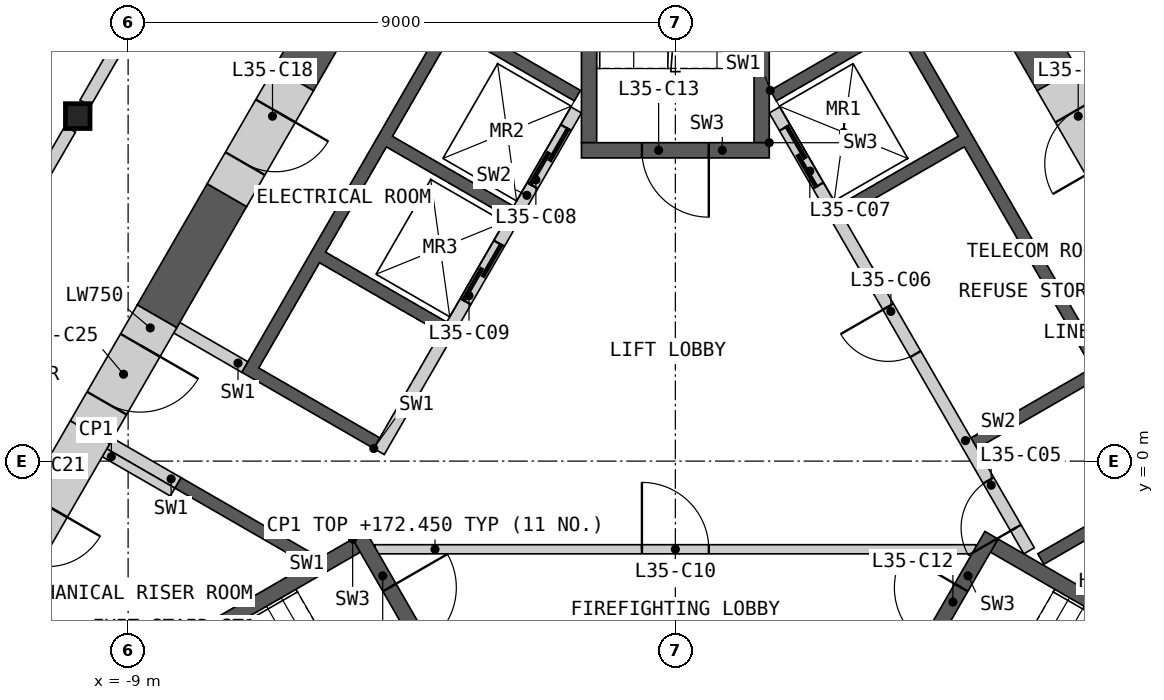
"""IFC4 building model, lengths in metres.
Left out: names, types, materials, properties, quantities, classifications, styles, units other than length and angle.
Written with IfcOpenShell. Run it as: python <this file> out.ifc"""

import sys

from ifc_helpers import new_model, si_unit, direction, frame, frame_2d, origin, origin_2d, place, context, subcontext, project, spatial, polyline, rectangle, i_section, outline, extrude, element, fill, save


model = new_model("IFC4")
c1 = context("Model", 3, precision=1e-05, world=origin(), true_north=direction((0.0, 1.0)))
c2 = subcontext(c1, "Body", "Model", "MODEL_VIEW")
j1 = project(units=[si_unit("LENGTHUNIT", "METRE"), si_unit("PLANEANGLEUNIT", "RADIAN")], contexts=[c1])
p1 = place(None, origin())
s1 = spatial("IfcSite", under=j1, at=p1, CompositionType="ELEMENT")
p2 = place(p1, origin())
s2 = spatial("IfcBuilding", under=s1, at=p2, CompositionType="ELEMENT")
p3 = place(p2, frame((0.0, 0.0, 169.2)))
s3 = spatial("IfcBuildingStorey", under=s2, at=p3, CompositionType="ELEMENT", Elevation=169.2)
p4 = place(p3, frame((-9.828, 5.675, 0.0), z_axis=(0.0, 0.0, 1.0), x_axis=(1.0, 0.0, 0.0)))
e1 = element("IfcColumn", 1, at=p4, inside=s3, PredefinedType="COLUMN", context=c2, shape_type="SweptSolid", body=[
    extrude(i_section(OverallWidth=0.404, OverallDepth=0.407, WebThickness=0.027, FlangeThickness=0.044, at=origin_2d()), origin(), (0.0, 0.0, 1.0), 3.6),
])
p5 = place(p3, origin())
e2 = element("IfcWall", 2, at=p5, inside=s3, PredefinedType="SHEAR", context=c2, shape_type="SweptSolid", body=[
    extrude(outline(polyline([(1.561, 6.097), (3.731, 7.35), (7.131, 1.461), (4.96, 0.208), (4.861, 0.381), (6.852, 1.531), (4.752, 5.169), (2.76, 4.019), (2.66, 4.192), (4.652, 5.342), (3.652, 7.074), (1.66, 5.924), (1.561, 6.097)])), origin(), (0.0, 0.0, 1.0), 3.25),
])
p6 = place(p3, origin())
e3 = element("IfcWall", 3, at=p6, inside=s3, PredefinedType="SHEAR", context=c2, shape_type="SweptSolid", body=[
    extrude(outline(polyline([(8.231, -0.444), (6.061, -1.697), (5.96, -1.524), (8.131, -0.271), (8.231, -0.444)])), origin(), (0.0, 0.0, 1.0), 3.25),
])
p7 = place(p3, frame((5.817, -1.476, 0.0), z_axis=(0.0, 0.0, 1.0), x_axis=(-0.500002616675, 0.866023893041, 0.0)))
e4 = element("IfcWall", 4, at=p7, inside=s3, PredefinedType="SOLIDWALL", context=c2, shape_type="SweptSolid", body=[
    extrude(rectangle(XDim=8.373, YDim=0.2, at=frame_2d((4.187, 0.0))), origin(), (0.0, 0.0, 1.0), 3.25),
])
p8 = place(p7, frame((0.437, 0.0, 0.0)))
e5 = element("IfcOpeningElement", 5, at=p8, cuts=e4, PredefinedType="OPENING", context=c2, shape_type="SweptSolid", body=[
    extrude(rectangle(XDim=0.9, YDim=2.1, at=frame_2d((0.45, 1.05))), frame((0.0, 0.11, 0.0), z_axis=(0.0, -1.0, 0.0), x_axis=(1.0, 0.0, 0.0)), (0.0, 0.0, 1.0), 0.22),
])
p9 = place(p7, frame((3.737, 0.0, 0.0)))
e6 = element("IfcOpeningElement", 6, at=p9, cuts=e4, PredefinedType="OPENING", context=c2, shape_type="SweptSolid", body=[
    extrude(rectangle(XDim=0.9, YDim=2.1, at=frame_2d((0.45, 1.05))), frame((0.0, 0.11, 0.0), z_axis=(0.0, -1.0, 0.0), x_axis=(1.0, 0.0, 0.0)), (0.0, 0.0, 1.0), 0.22),
])
p10 = place(p7, frame((6.937, 0.0, 0.0)))
e7 = element("IfcOpeningElement", 7, at=p10, cuts=e4, PredefinedType="OPENING", context=c2, shape_type="SweptSolid", body=[
    extrude(rectangle(XDim=1.1, YDim=2.1, at=frame_2d((0.55, 1.05))), frame((0.0, 0.11, 0.0), z_axis=(0.0, -1.0, 0.0), x_axis=(1.0, 0.0, 0.0)), (0.0, 0.0, 1.0), 0.22),
])
p11 = place(p3, origin())
e8 = element("IfcWall", 8, at=p11, inside=s3, PredefinedType="SHEAR", context=c2, shape_type="SweptSolid", body=[
    extrude(outline(polyline([(-6.061, -1.697), (-8.231, -0.444), (-8.131, -0.271), (-5.96, -1.524), (-6.061, -1.697)])), origin(), (0.0, 0.0, 1.0), 3.25),
])
p12 = place(p3, origin())
e9 = element("IfcWall", 9, at=p12, inside=s3, PredefinedType="SHEAR", context=c2, shape_type="SweptSolid", body=[
    extrude(outline(polyline([(-4.96, 0.208), (-7.131, 1.461), (-3.731, 7.35), (-1.561, 6.097), (-1.66, 5.924), (-3.652, 7.074), (-4.652, 5.342), (-2.66, 4.192), (-2.76, 4.019), (-4.752, 5.169), (-5.752, 3.437), (-3.76, 2.287), (-3.861, 2.113), (-5.852, 3.263), (-6.852, 1.531), (-4.861, 0.381), (-4.96, 0.208)])), origin(), (0.0, 0.0, 1.0), 3.25),
])
p13 = place(p3, frame((-1.631, 5.776, 0.0), z_axis=(0.0, 0.0, 1.0), x_axis=(-0.499992876559, -0.866029516466, 0.0)))
e10 = element("IfcWall", 10, at=p13, inside=s3, PredefinedType="SOLIDWALL", context=c2, shape_type="SweptSolid", body=[
    extrude(rectangle(XDim=6.486, YDim=0.2, at=frame_2d((3.243, 0.0))), origin(), (0.0, 0.0, 1.0), 3.25),
])
p14 = place(p13, frame((0.337, 0.0, 0.0)))
e11 = element("IfcOpeningElement", 11, at=p14, cuts=e10, PredefinedType="OPENING", context=c2, shape_type="SweptSolid", body=[
    extrude(rectangle(XDim=1.1, YDim=2.1, at=frame_2d((0.55, 1.05))), frame((0.0, 0.11, 0.0), z_axis=(0.0, -1.0, 0.0), x_axis=(1.0, 0.0, 0.0)), (0.0, 0.0, 1.0), 0.22),
])
p15 = place(p13, frame((2.537, 0.0, 0.0)))
e12 = element("IfcOpeningElement", 12, at=p15, cuts=e10, PredefinedType="OPENING", context=c2, shape_type="SweptSolid", body=[
    extrude(rectangle(XDim=1.1, YDim=2.1, at=frame_2d((0.55, 1.05))), frame((0.0, 0.11, 0.0), z_axis=(0.0, -1.0, 0.0), x_axis=(1.0, 0.0, 0.0)), (0.0, 0.0, 1.0), 0.22),
])
for number, where, z_axis, x_axis in (
    (13, (-7.081, 1.548, 0.0), (0.0, 0.0, 1.0), (-0.866, 0.5, 0.0)),
    (14, (-8.181, -0.357, 0.0), (0.0, 0.0, 1.0), (-0.866, 0.5, 0.0)),
):
    element("IfcWall", number, at=place(p3, frame(where, z_axis=z_axis, x_axis=x_axis)), inside=s3, PredefinedType="SHEAR", context=c2, shape_type="SweptSolid", body=[
        extrude(rectangle(XDim=1.293, YDim=0.2, at=frame_2d((0.646, 0.0))), origin(), (0.0, 0.0, 1.0), 3.25),
    ])
p16 = place(p3, frame((-4.941, -1.45, 0.0), z_axis=(0.0, 0.0, 1.0), x_axis=(1.0, 0.0, 0.0)))
e15 = element("IfcWall", 15, at=p16, inside=s3, PredefinedType="PARTITIONING", context=c2, shape_type="SweptSolid", body=[
    extrude(rectangle(XDim=9.882, YDim=0.15, at=frame_2d((4.941, 0.0))), origin(), (0.0, 0.0, 1.0), 3.25),
])
p17 = place(p16, frame((4.391, 0.0, 0.0)))
e16 = element("IfcOpeningElement", 16, at=p17, cuts=e15, PredefinedType="OPENING", context=c2, shape_type="SweptSolid", body=[
    extrude(rectangle(XDim=1.1, YDim=2.1, at=frame_2d((0.55, 1.05))), frame((0.0, 0.085, 0.0), z_axis=(0.0, -1.0, 0.0), x_axis=(1.0, 0.0, 0.0)), (0.0, 0.0, 1.0), 0.17),
])
p18 = place(p3, origin())
e17 = element("IfcWall", 17, at=p18, inside=s3, PredefinedType="SHEAR", context=c2, shape_type="SweptSolid", body=[
    extrude(outline(polyline([(-5.307, -1.281), (-10.374, -4.206), (-10.032, -4.298), (-5.182, -1.498), (-5.307, -1.281)])), origin(), (0.0, 0.0, 1.0), 3.25),
])
p19 = place(p3, frame((-5.199, -1.219, 0.0), z_axis=(0.0, 0.0, 1.0), x_axis=(0.499982516597, -0.866035497597, 0.0)))
e18 = element("IfcWall", 18, at=p19, inside=s3, PredefinedType="SHEAR", context=c2, shape_type="SweptSolid", body=[
    extrude(rectangle(XDim=3.088, YDim=0.25, at=frame_2d((1.544, 0.0))), origin(), (0.0, 0.0, 1.0), 3.25),
])
p20 = place(p19, frame((0.994, 0.0, 0.0)))
e19 = element("IfcOpeningElement", 19, at=p20, cuts=e18, PredefinedType="OPENING", context=c2, shape_type="SweptSolid", body=[
    extrude(rectangle(XDim=1.1, YDim=2.1, at=frame_2d((0.55, 1.05))), frame((0.0, 0.135, 0.0), z_axis=(0.0, -1.0, 0.0), x_axis=(1.0, 0.0, 0.0)), (0.0, 0.0, 1.0), 0.27),
])
p21 = place(p3, origin())
e20 = element("IfcWall", 20, at=p21, inside=s3, PredefinedType="SHEAR", context=c2, shape_type="SweptSolid", body=[
    extrude(outline(polyline([(10.032, -4.298), (10.374, -4.206), (5.307, -1.281), (5.182, -1.498), (10.032, -4.298)])), origin(), (0.0, 0.0, 1.0), 3.25),
])
p22 = place(p3, frame((3.655, -3.893, 0.0), z_axis=(0.0, 0.0, 1.0), x_axis=(0.499982516597, 0.866035497597, 0.0)))
e21 = element("IfcWall", 21, at=p22, inside=s3, PredefinedType="SHEAR", context=c2, shape_type="SweptSolid", body=[
    extrude(rectangle(XDim=3.088, YDim=0.25, at=frame_2d((1.544, 0.0))), origin(), (0.0, 0.0, 1.0), 3.25),
])
p23 = place(p22, frame((0.994, 0.0, 0.0)))
e22 = element("IfcOpeningElement", 22, at=p23, cuts=e21, PredefinedType="OPENING", context=c2, shape_type="SweptSolid", body=[
    extrude(rectangle(XDim=1.1, YDim=2.1, at=frame_2d((0.55, 1.05))), frame((0.0, 0.135, 0.0), z_axis=(0.0, -1.0, 0.0), x_axis=(1.0, 0.0, 0.0)), (0.0, 0.0, 1.0), 0.27),
])
p24 = place(p3, origin())
e23 = element("IfcWall", 23, at=p24, inside=s3, PredefinedType="SHEAR", context=c2, shape_type="SweptSolid", body=[
    extrude(outline(polyline([(1.544, 5.237), (1.544, 11.087), (1.294, 10.837), (1.294, 5.237), (1.544, 5.237)])), origin(), (0.0, 0.0, 1.0), 3.25),
])
p25 = place(p3, origin())
e24 = element("IfcWall", 24, at=p25, inside=s3, PredefinedType="SHEAR", context=c2, shape_type="SweptSolid", body=[
    extrude(outline(polyline([(-1.294, 10.837), (-1.544, 11.087), (-1.544, 5.237), (-1.294, 5.237), (-1.294, 10.837)])), origin(), (0.0, 0.0, 1.0), 3.25),
])
p26 = place(p3, frame((1.544, 5.112, 0.0), z_axis=(0.0, 0.0, 1.0), x_axis=(-1.0, 0.0, 0.0)))
e25 = element("IfcWall", 25, at=p26, inside=s3, PredefinedType="SHEAR", context=c2, shape_type="SweptSolid", body=[
    extrude(rectangle(XDim=3.088, YDim=0.25, at=frame_2d((1.544, 0.0))), origin(), (0.0, 0.0, 1.0), 3.25),
])
p27 = place(p26, frame((0.994, 0.0, 0.0)))
e26 = element("IfcOpeningElement", 26, at=p27, cuts=e25, PredefinedType="OPENING", context=c2, shape_type="SweptSolid", body=[
    extrude(rectangle(XDim=1.1, YDim=2.1, at=frame_2d((0.55, 1.05))), frame((0.0, 0.135, 0.0), z_axis=(0.0, -1.0, 0.0), x_axis=(1.0, 0.0, 0.0)), (0.0, 0.0, 1.0), 0.27),
])
p28 = place(p3, frame((-8.268, -0.509, 0.0), z_axis=(0.0, 0.0, 1.0), x_axis=(-0.866003189247, 0.500038474733, 0.0)))
e27 = element("IfcWall", 27, at=p28, inside=s3, PredefinedType="PARTITIONING", context=c2, shape_type="SweptSolid", body=[
    extrude(rectangle(XDim=1.293, YDim=0.15, at=frame_2d((0.646, 0.0))), origin(), (0.0, 0.0, 1.0), 3.25),
])
for number, where, z_axis, x_axis in (
    (28, (6.275, 6.279, 0.0), (0.0, 0.0, 1.0), (-0.5, 0.866, 0.0)),
    (29, (-4.817, 8.804, 0.0), (0.0, 0.0, 1.0), (-0.5, -0.866, 0.0)),
):
    element("IfcWall", number, at=place(p3, frame(where, z_axis=z_axis, x_axis=x_axis)), inside=s3, PredefinedType="SHEAR", context=c2, shape_type="SweptSolid", body=[
        extrude(rectangle(XDim=2.916, YDim=0.75, at=frame_2d((1.458, 0.0))), origin(), (0.0, 0.0, 1.0), 3.25),
    ])
p29 = place(p3, frame((-7.375, 4.374, 0.0), z_axis=(0.0, 0.0, 1.0), x_axis=(-0.499952165731, -0.866053019151, 0.0)))
e30 = element("IfcWall", 30, at=p29, inside=s3, PredefinedType="SHEAR", context=c2, shape_type="SweptSolid", body=[
    extrude(rectangle(XDim=2.3, YDim=0.75, at=frame_2d((1.15, 0.0))), origin(), (0.0, 0.0, 1.0), 3.25),
])
p30 = place(p3, frame((-6.275, 6.279, 0.0), z_axis=(0.0, 0.0, 1.0), x_axis=(-0.499946605688, -0.86605622881, 0.0)))
e31 = element("IfcWall", 31, at=p30, inside=s3, PredefinedType="SHEAR", context=c2, shape_type="SweptSolid", body=[
    extrude(rectangle(XDim=2.2, YDim=0.75, at=frame_2d((1.1, 0.0))), origin(), (0.0, 0.0, 1.0), 3.25),
])
p31 = place(p30, frame((0.6, 0.0, 0.0)))
e32 = element("IfcOpeningElement", 32, at=p31, cuts=e31, PredefinedType="OPENING", context=c2, shape_type="SweptSolid", body=[
    extrude(rectangle(XDim=1.0, YDim=2.1, at=frame_2d((0.5, 1.05))), frame((0.0, 0.385, 0.0), z_axis=(0.0, -1.0, 0.0), x_axis=(1.0, 0.0, 0.0)), (0.0, 0.0, 1.0), 0.77),
])
p32 = place(p3, frame((7.375, 4.374, 0.0), z_axis=(0.0, 0.0, 1.0), x_axis=(-0.499946605688, 0.86605622881, 0.0)))
e33 = element("IfcWall", 33, at=p32, inside=s3, PredefinedType="SHEAR", context=c2, shape_type="SweptSolid", body=[
    extrude(rectangle(XDim=2.2, YDim=0.75, at=frame_2d((1.1, 0.0))), origin(), (0.0, 0.0, 1.0), 3.25),
])
p33 = place(p32, frame((0.6, 0.0, 0.0)))
e34 = element("IfcOpeningElement", 34, at=p33, cuts=e33, PredefinedType="OPENING", context=c2, shape_type="SweptSolid", body=[
    extrude(rectangle(XDim=1.0, YDim=2.1, at=frame_2d((0.5, 1.05))), frame((0.0, 0.385, 0.0), z_axis=(0.0, -1.0, 0.0), x_axis=(1.0, 0.0, 0.0)), (0.0, 0.0, 1.0), 0.77),
])
p34 = place(p3, frame((-9.625, 0.477, 0.0), z_axis=(0.0, 0.0, 1.0), x_axis=(-0.499995718215, -0.86602787586, 0.0)))
e35 = element("IfcWall", 35, at=p34, inside=s3, PredefinedType="SHEAR", context=c2, shape_type="SweptSolid", body=[
    extrude(rectangle(XDim=3.016, YDim=0.75, at=frame_2d((1.508, 0.0))), origin(), (0.0, 0.0, 1.0), 3.25),
])
p35 = place(p34, frame((1.4, 0.0, 0.0)))
e36 = element("IfcOpeningElement", 36, at=p35, cuts=e35, PredefinedType="OPENING", context=c2, shape_type="SweptSolid", body=[
    extrude(rectangle(XDim=1.0, YDim=2.1, at=frame_2d((0.5, 1.05))), frame((0.0, 0.385, 0.0), z_axis=(0.0, -1.0, 0.0), x_axis=(1.0, 0.0, 0.0)), (0.0, 0.0, 1.0), 0.77),
])
p36 = place(p3, frame((-8.525, 2.382, 0.0), z_axis=(0.0, 0.0, 1.0), x_axis=(-0.500077893725, -0.86598042715, 0.0)))
e37 = element("IfcWall", 37, at=p36, inside=s3, PredefinedType="SHEAR", context=c2, shape_type="SweptSolid", body=[
    extrude(rectangle(XDim=2.2, YDim=0.75, at=frame_2d((1.1, 0.0))), origin(), (0.0, 0.0, 1.0), 3.25),
])
p37 = place(p36, frame((0.55, 0.0, 0.0)))
e38 = element("IfcOpeningElement", 38, at=p37, cuts=e37, PredefinedType="OPENING", context=c2, shape_type="SweptSolid", body=[
    extrude(rectangle(XDim=1.1, YDim=2.1, at=frame_2d((0.55, 1.05))), frame((0.0, 0.385, 0.0), z_axis=(0.0, -1.0, 0.0), x_axis=(1.0, 0.0, 0.0)), (0.0, 0.0, 1.0), 0.77),
])
p38 = place(p3, frame((5.038, 13.972, 0.0), z_axis=(0.0, 0.0, 1.0), x_axis=(0.50000393355, -0.866023132736, 0.0)))
e39 = element("IfcWall", 39, at=p38, inside=s3, PredefinedType="PARTITIONING", context=c2, shape_type="SweptSolid", body=[
    extrude(rectangle(XDim=9.335, YDim=0.2, at=frame_2d((4.667, 0.0))), origin(), (0.0, 0.0, 1.0), 3.25),
])
p39 = place(p38, frame((1.154, 0.0, 0.0)))
e40 = element("IfcOpeningElement", 40, at=p39, cuts=e39, PredefinedType="OPENING", context=c2, shape_type="SweptSolid", body=[
    extrude(rectangle(XDim=1.1, YDim=2.1, at=frame_2d((0.55, 1.05))), frame((0.0, 0.11, 0.0), z_axis=(0.0, -1.0, 0.0), x_axis=(1.0, 0.0, 0.0)), (0.0, 0.0, 1.0), 0.22),
])
p40 = place(p3, frame((-9.705, 5.888, 0.0), z_axis=(0.0, 0.0, 1.0), x_axis=(0.50000393355, 0.866023132736, 0.0)))
e41 = element("IfcWall", 41, at=p40, inside=s3, PredefinedType="PARTITIONING", context=c2, shape_type="SweptSolid", body=[
    extrude(rectangle(XDim=9.335, YDim=0.2, at=frame_2d((4.667, 0.0))), origin(), (0.0, 0.0, 1.0), 3.25),
])
p41 = place(p40, frame((5.172, 0.0, 0.0)))
e42 = element("IfcOpeningElement", 42, at=p41, cuts=e41, PredefinedType="OPENING", context=c2, shape_type="SweptSolid", body=[
    extrude(rectangle(XDim=1.0, YDim=2.1, at=frame_2d((0.5, 1.05))), frame((0.0, 0.11, 0.0), z_axis=(0.0, -1.0, 0.0), x_axis=(1.0, 0.0, 0.0)), (0.0, 0.0, 1.0), 0.22),
])
p42 = place(p40, frame((1.556, 0.0, 0.0)))
e43 = element("IfcOpeningElement", 43, at=p42, cuts=e41, PredefinedType="OPENING", context=c2, shape_type="SweptSolid", body=[
    extrude(rectangle(XDim=1.8, YDim=2.1, at=frame_2d((0.9, 1.05))), frame((0.0, 0.11, 0.0), z_axis=(0.0, -1.0, 0.0), x_axis=(1.0, 0.0, 0.0)), (0.0, 0.0, 1.0), 0.22),
])
p43 = place(p3, frame((-14.619, -2.624, 0.0), z_axis=(0.0, 0.0, 1.0), x_axis=(0.50000393355, 0.866023132736, 0.0)))
e44 = element("IfcWall", 44, at=p43, inside=s3, PredefinedType="PARTITIONING", context=c2, shape_type="SweptSolid", body=[
    extrude(rectangle(XDim=9.335, YDim=0.2, at=frame_2d((4.667, 0.0))), origin(), (0.0, 0.0, 1.0), 3.25),
])
p44 = place(p43, frame((3.163, 0.0, 0.0)))
e45 = element("IfcOpeningElement", 45, at=p44, cuts=e44, PredefinedType="OPENING", context=c2, shape_type="SweptSolid", body=[
    extrude(rectangle(XDim=1.0, YDim=2.1, at=frame_2d((0.5, 1.05))), frame((0.0, 0.11, 0.0), z_axis=(0.0, -1.0, 0.0), x_axis=(1.0, 0.0, 0.0)), (0.0, 0.0, 1.0), 0.22),
])
p45 = place(p8, origin())
e46 = element("IfcDoor", 46, at=p45, inside=s3, OperationType="SINGLE_SWING_LEFT", PredefinedType="DOOR", context=c2, shape_type="SweptSolid", body=[
    extrude(rectangle(XDim=0.9, YDim=2.1, at=frame_2d((0.45, 1.05))), frame((0.0, 0.025, 0.0), z_axis=(0.0, -1.0, 0.0), x_axis=(1.0, 0.0, 0.0)), (0.0, 0.0, 1.0), 0.05),
])
fill(e5, e46)
p46 = place(p9, origin())
e47 = element("IfcDoor", 47, at=p46, inside=s3, OperationType="SINGLE_SWING_RIGHT", PredefinedType="DOOR", context=c2, shape_type="SweptSolid", body=[
    extrude(rectangle(XDim=0.9, YDim=2.1, at=frame_2d((0.45, 1.05))), frame((0.0, 0.025, 0.0), z_axis=(0.0, -1.0, 0.0), x_axis=(1.0, 0.0, 0.0)), (0.0, 0.0, 1.0), 0.05),
])
fill(e6, e47)
p47 = place(p10, origin())
e48 = element("IfcDoor", 48, at=p47, inside=s3, OperationType="SLIDING_TO_LEFT", PredefinedType="DOOR", context=c2, shape_type="SweptSolid", body=[
    extrude(rectangle(XDim=1.1, YDim=2.1, at=frame_2d((0.55, 1.05))), frame((0.0, 0.025, 0.0), z_axis=(0.0, -1.0, 0.0), x_axis=(1.0, 0.0, 0.0)), (0.0, 0.0, 1.0), 0.05),
])
fill(e7, e48)
p48 = place(p14, origin())
e49 = element("IfcDoor", 49, at=p48, inside=s3, OperationType="SLIDING_TO_LEFT", PredefinedType="DOOR", context=c2, shape_type="SweptSolid", body=[
    extrude(rectangle(XDim=1.1, YDim=2.1, at=frame_2d((0.55, 1.05))), frame((0.0, 0.025, 0.0), z_axis=(0.0, -1.0, 0.0), x_axis=(1.0, 0.0, 0.0)), (0.0, 0.0, 1.0), 0.05),
])
fill(e11, e49)
p49 = place(p15, origin())
e50 = element("IfcDoor", 50, at=p49, inside=s3, OperationType="SLIDING_TO_LEFT", PredefinedType="DOOR", context=c2, shape_type="SweptSolid", body=[
    extrude(rectangle(XDim=1.1, YDim=2.1, at=frame_2d((0.55, 1.05))), frame((0.0, 0.025, 0.0), z_axis=(0.0, -1.0, 0.0), x_axis=(1.0, 0.0, 0.0)), (0.0, 0.0, 1.0), 0.05),
])
fill(e12, e50)
p50 = place(p17, origin())
e51 = element("IfcDoor", 51, at=p50, inside=s3, OperationType="SINGLE_SWING_LEFT", PredefinedType="DOOR", context=c2, shape_type="SweptSolid", body=[
    extrude(rectangle(XDim=1.1, YDim=2.1, at=frame_2d((0.55, 1.05))), frame((0.0, 0.025, 0.0), z_axis=(0.0, -1.0, 0.0), x_axis=(1.0, 0.0, 0.0)), (0.0, 0.0, 1.0), 0.05),
])
fill(e16, e51)
p51 = place(p20, origin())
e52 = element("IfcDoor", 52, at=p51, inside=s3, OperationType="SINGLE_SWING_LEFT", PredefinedType="DOOR", context=c2, shape_type="SweptSolid", body=[
    extrude(rectangle(XDim=1.1, YDim=2.1, at=frame_2d((0.55, 1.05))), frame((0.0, 0.025, 0.0), z_axis=(0.0, -1.0, 0.0), x_axis=(1.0, 0.0, 0.0)), (0.0, 0.0, 1.0), 0.05),
])
fill(e19, e52)
p52 = place(p23, origin())
e53 = element("IfcDoor", 53, at=p52, inside=s3, OperationType="SINGLE_SWING_RIGHT", PredefinedType="DOOR", context=c2, shape_type="SweptSolid", body=[
    extrude(rectangle(XDim=1.1, YDim=2.1, at=frame_2d((0.55, 1.05))), frame((0.0, 0.025, 0.0), z_axis=(0.0, -1.0, 0.0), x_axis=(1.0, 0.0, 0.0)), (0.0, 0.0, 1.0), 0.05),
])
fill(e22, e53)
p53 = place(p27, origin())
e54 = element("IfcDoor", 54, at=p53, inside=s3, OperationType="SINGLE_SWING_LEFT", PredefinedType="DOOR", context=c2, shape_type="SweptSolid", body=[
    extrude(rectangle(XDim=1.1, YDim=2.1, at=frame_2d((0.55, 1.05))), frame((0.0, 0.025, 0.0), z_axis=(0.0, -1.0, 0.0), x_axis=(1.0, 0.0, 0.0)), (0.0, 0.0, 1.0), 0.05),
])
fill(e26, e54)
p54 = place(p31, origin())
e55 = element("IfcDoor", 55, at=p54, inside=s3, OperationType="SINGLE_SWING_LEFT", PredefinedType="DOOR", context=c2, shape_type="SweptSolid", body=[
    extrude(rectangle(XDim=1.0, YDim=2.1, at=frame_2d((0.5, 1.05))), frame((0.0, 0.13, 0.0), z_axis=(0.0, -1.0, 0.0), x_axis=(1.0, 0.0, 0.0)), (0.0, 0.0, 1.0), 0.05),
])
fill(e32, e55)
p55 = place(p33, origin())
e56 = element("IfcDoor", 56, at=p55, inside=s3, OperationType="SINGLE_SWING_LEFT", PredefinedType="DOOR", context=c2, shape_type="SweptSolid", body=[
    extrude(rectangle(XDim=1.0, YDim=2.1, at=frame_2d((0.5, 1.05))), frame((0.0, 0.13, 0.0), z_axis=(0.0, -1.0, 0.0), x_axis=(1.0, 0.0, 0.0)), (0.0, 0.0, 1.0), 0.05),
])
fill(e34, e56)
p56 = place(p35, origin())
e57 = element("IfcDoor", 57, at=p56, inside=s3, OperationType="SINGLE_SWING_LEFT", PredefinedType="DOOR", context=c2, shape_type="SweptSolid", body=[
    extrude(rectangle(XDim=1.0, YDim=2.1, at=frame_2d((0.5, 1.05))), frame((0.0, 0.13, 0.0), z_axis=(0.0, -1.0, 0.0), x_axis=(1.0, 0.0, 0.0)), (0.0, 0.0, 1.0), 0.05),
])
fill(e36, e57)
p57 = place(p37, origin())
e58 = element("IfcDoor", 58, at=p57, inside=s3, OperationType="SINGLE_SWING_LEFT", PredefinedType="DOOR", context=c2, shape_type="SweptSolid", body=[
    extrude(rectangle(XDim=1.1, YDim=2.1, at=frame_2d((0.55, 1.05))), frame((0.0, 0.13, 0.0), z_axis=(0.0, -1.0, 0.0), x_axis=(1.0, 0.0, 0.0)), (0.0, 0.0, 1.0), 0.05),
])
fill(e38, e58)
save(model, sys.argv[1])
